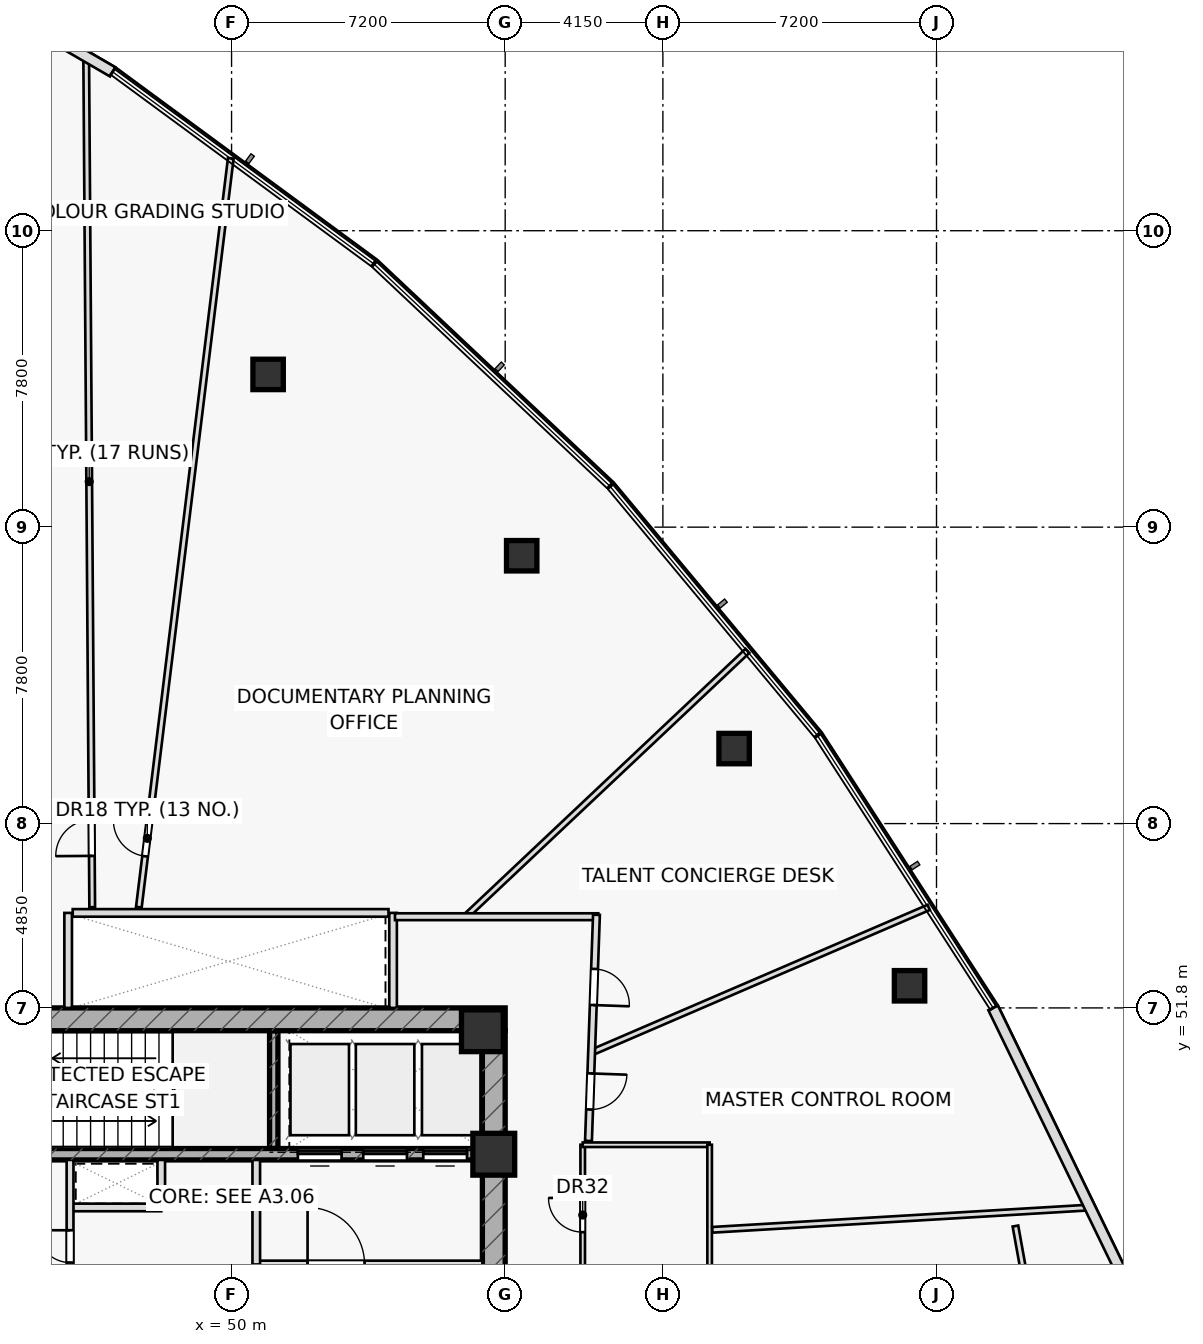
"""IFC4 building model, lengths in metres.
Left out: names, types, materials, properties, quantities, classifications, styles, units other than length and angle.
Written with IfcOpenShell. Run it as: python <this file> out.ifc"""

import sys

from ifc_helpers import new_model, si_unit, direction, frame, frame_2d, origin, origin_2d, place, context, subcontext, project, spatial, rectangle, hollow_rectangle, extrude, element, fill, save


model = new_model("IFC4")
c1 = context("Model", 3, precision=1e-05, world=origin(), true_north=direction((0.0, 1.0)))
c2 = subcontext(c1, "Body", "Model", "MODEL_VIEW")
j1 = project(units=[si_unit("LENGTHUNIT", "METRE"), si_unit("PLANEANGLEUNIT", "RADIAN")], contexts=[c1])
p1 = place(None, origin())
s1 = spatial("IfcSite", under=j1, at=p1, CompositionType="ELEMENT")
p2 = place(p1, origin())
s2 = spatial("IfcBuilding", under=s1, at=p2, CompositionType="ELEMENT")
p3 = place(p2, frame((0.0, 0.0, 51.0)))
s3 = spatial("IfcBuildingStorey", under=s2, at=p3, CompositionType="ELEMENT", Elevation=51.0)
p4 = place(p3, frame((51.11, 48.1, 0.0), z_axis=(0.0, 0.0, 1.0), x_axis=(0.0, 1.0, 0.0)))
e1 = element("IfcWall", 1, at=p4, inside=s3, PredefinedType="SHEAR", context=c2, shape_type="SweptSolid", body=[
    extrude(rectangle(XDim=3.1, YDim=0.22, at=frame_2d((1.55, 0.0))), origin(), (0.0, 0.0, 1.0), 3.6),
])
p5 = place(p3, frame((42.8, 51.5, 0.0), z_axis=(0.0, 0.0, 1.0), x_axis=(1.0, 0.0, 0.0)))
e2 = element("IfcWall", 2, at=p5, inside=s3, PredefinedType="SHEAR", context=c2, shape_type="SweptSolid", body=[
    extrude(rectangle(XDim=14.4, YDim=0.6, at=frame_2d((7.2, 0.0))), origin(), (0.0, 0.0, 1.0), 3.6),
])
p6 = place(p5, frame((0.88, 0.0, 0.0)))
e3 = element("IfcOpeningElement", 3, at=p6, cuts=e2, PredefinedType="OPENING", context=c2, shape_type="SweptSolid", body=[
    extrude(rectangle(XDim=1.05, YDim=2.2, at=frame_2d((0.525, 1.1))), frame((0.0, 0.31, 0.0), z_axis=(0.0, -1.0, 0.0), x_axis=(1.0, 0.0, 0.0)), (0.0, 0.0, 1.0), 0.62),
])
p7 = place(p3, frame((56.9, 38.8, 0.0), z_axis=(0.0, 0.0, 1.0), x_axis=(0.0, 1.0, 0.0)))
e4 = element("IfcWall", 4, at=p7, inside=s3, PredefinedType="SHEAR", context=c2, shape_type="SweptSolid", body=[
    extrude(rectangle(XDim=12.4, YDim=0.6, at=frame_2d((6.2, 0.0))), origin(), (0.0, 0.0, 1.0), 3.6),
])
p8 = place(p7, frame((3.85, 0.0, 0.0)))
e5 = element("IfcOpeningElement", 5, at=p8, cuts=e4, PredefinedType="OPENING", context=c2, shape_type="SweptSolid", body=[
    extrude(rectangle(XDim=1.5, YDim=2.2, at=frame_2d((0.75, 1.1))), frame((0.0, 0.31, 0.0), z_axis=(0.0, -1.0, 0.0), x_axis=(1.0, 0.0, 0.0)), (0.0, 0.0, 1.0), 0.62),
])
p9 = place(p3, frame((43.4, 47.95, 0.0), z_axis=(0.0, 0.0, 1.0), x_axis=(1.0, 0.0, 0.0)))
e6 = element("IfcWall", 6, at=p9, inside=s3, PredefinedType="SHEAR", context=c2, shape_type="SweptSolid", body=[
    extrude(rectangle(XDim=13.2, YDim=0.3, at=frame_2d((6.6, 0.0))), origin(), (0.0, 0.0, 1.0), 3.6),
])
p10 = place(p9, frame((8.345, 0.0, 0.0)))
e7 = element("IfcOpeningElement", 7, at=p10, cuts=e6, PredefinedType="OPENING", context=c2, shape_type="SweptSolid", body=[
    extrude(rectangle(XDim=1.15, YDim=2.2, at=frame_2d((0.575, 1.1))), frame((0.0, 0.16, 0.0), z_axis=(0.0, -1.0, 0.0), x_axis=(1.0, 0.0, 0.0)), (0.0, 0.0, 1.0), 0.32),
])
p11 = place(p9, frame((10.065, 0.0, 0.0)))
e8 = element("IfcOpeningElement", 8, at=p11, cuts=e6, PredefinedType="OPENING", context=c2, shape_type="SweptSolid", body=[
    extrude(rectangle(XDim=1.15, YDim=2.2, at=frame_2d((0.575, 1.1))), frame((0.0, 0.16, 0.0), z_axis=(0.0, -1.0, 0.0), x_axis=(1.0, 0.0, 0.0)), (0.0, 0.0, 1.0), 0.32),
])
p12 = place(p9, frame((11.645, 0.0, 0.0)))
e9 = element("IfcOpeningElement", 9, at=p12, cuts=e6, PredefinedType="OPENING", context=c2, shape_type="SweptSolid", body=[
    extrude(rectangle(XDim=1.15, YDim=2.2, at=frame_2d((0.575, 1.1))), frame((0.0, 0.16, 0.0), z_axis=(0.0, -1.0, 0.0), x_axis=(1.0, 0.0, 0.0)), (0.0, 0.0, 1.0), 0.32),
])
for number, where, z_axis, x_axis in (
    (10, (56.9, 47.95, 0.0), (0.0, 0.0, 1.0), (1.0, 0.0, 0.0)),
    (11, (56.6, 51.2, 0.0), (0.0, 0.0, 1.0), (1.0, 0.0, 0.0)),
):
    element("IfcColumn", number, at=place(p3, frame(where, z_axis=z_axis, x_axis=x_axis)), inside=s3, PredefinedType="COLUMN", context=c2, shape_type="SweptSolid", body=[
        extrude(rectangle(XDim=1.1, YDim=1.1, at=origin_2d()), origin(), (0.0, 0.0, 1.0), 3.6),
    ])
for number, where, z_axis, x_axis in (
    (12, (67.841, 52.383, 0.0), (0.0, 0.0, 1.0), (1.0, 0.0, 0.0)),
    (13, (63.224, 58.624, 0.0), (0.0, 0.0, 1.0), (1.0, 0.0, 0.0)),
    (14, (57.635, 63.698, 0.0), (0.0, 0.0, 1.0), (1.0, 0.0, 0.0)),
    (15, (50.962, 68.469, 0.0), (0.0, 0.0, 1.0), (1.0, 0.0, 0.0)),
):
    element("IfcColumn", number, at=place(p3, frame(where, z_axis=z_axis, x_axis=x_axis)), inside=s3, PredefinedType="COLUMN", context=c2, shape_type="SweptSolid", body=[
        extrude(hollow_rectangle(XDim=0.8, YDim=0.8, WallThickness=0.045, at=origin_2d()), origin(), (0.0, 0.0, 1.0), 3.6),
    ])
for number, where, z_axis, x_axis in (
    (16, (45.7, 51.8, 0.0), (0.0, 0.0, 1.0), (0.0, 1.0, 0.0)),
    (17, (54.25, 51.8, 0.0), (0.0, 0.0, 1.0), (0.0, 1.0, 0.0)),
):
    element("IfcWall", number, at=place(p3, frame(where, z_axis=z_axis, x_axis=x_axis)), inside=s3, PredefinedType="PARTITIONING", context=c2, shape_type="SweptSolid", body=[
        extrude(rectangle(XDim=2.5, YDim=0.2, at=frame_2d((1.25, 0.0))), origin(), (0.0, 0.0, 1.0), 3.6),
    ])
p13 = place(p3, frame((45.75, 46.55, 0.0), z_axis=(0.0, 0.0, 1.0), x_axis=(1.0, 0.0, 0.0)))
e18 = element("IfcWall", 18, at=p13, inside=s3, PredefinedType="PARTITIONING", context=c2, shape_type="SweptSolid", body=[
    extrude(rectangle(XDim=2.4, YDim=0.2, at=frame_2d((1.2, 0.0))), origin(), (0.0, 0.0, 1.0), 3.6),
])
p14 = place(p3, frame((48.15, 46.55, 0.0), z_axis=(0.0, 0.0, 1.0), x_axis=(0.0, 1.0, 0.0)))
e19 = element("IfcWall", 19, at=p14, inside=s3, PredefinedType="PARTITIONING", context=c2, shape_type="SweptSolid", body=[
    extrude(rectangle(XDim=1.25, YDim=0.2, at=frame_2d((0.625, 0.0))), origin(), (0.0, 0.0, 1.0), 3.6),
])
p15 = place(p3, frame((50.65, 45.05, 0.0), z_axis=(0.0, 0.0, 1.0), x_axis=(1.0, 0.0, 0.0)))
e20 = element("IfcWall", 20, at=p15, inside=s3, PredefinedType="PARTITIONING", context=c2, shape_type="SweptSolid", body=[
    extrude(rectangle(XDim=5.95, YDim=0.2, at=frame_2d((2.975, 0.0))), origin(), (0.0, 0.0, 1.0), 3.6),
])
p16 = place(p15, frame((1.35, 0.0, 0.0)))
e21 = element("IfcOpeningElement", 21, at=p16, cuts=e20, PredefinedType="OPENING", context=c2, shape_type="SweptSolid", body=[
    extrude(rectangle(XDim=1.5, YDim=2.2, at=frame_2d((0.75, 1.1))), frame((0.0, 0.11, 0.0), z_axis=(0.0, -1.0, 0.0), x_axis=(1.0, 0.0, 0.0)), (0.0, 0.0, 1.0), 0.22),
])
p17 = place(p3, frame((50.65, 45.05, 0.0), z_axis=(0.0, 0.0, 1.0), x_axis=(0.0, 1.0, 0.0)))
e22 = element("IfcWall", 22, at=p17, inside=s3, PredefinedType="PARTITIONING", context=c2, shape_type="SweptSolid", body=[
    extrude(rectangle(XDim=2.75, YDim=0.2, at=frame_2d((1.375, 0.0))), origin(), (0.0, 0.0, 1.0), 3.6),
])
p18 = place(p3, frame((45.75, 42.2, 0.0), z_axis=(0.0, 0.0, 1.0), x_axis=(0.0, 1.0, 0.0)))
e23 = element("IfcWall", 23, at=p18, inside=s3, PredefinedType="PARTITIONING", context=c2, shape_type="SweptSolid", body=[
    extrude(rectangle(XDim=5.6, YDim=0.18, at=frame_2d((2.8, 0.0))), origin(), (0.0, 0.0, 1.0), 3.6),
])
p19 = place(p18, frame((0.55, 0.0, 0.0)))
e24 = element("IfcOpeningElement", 24, at=p19, cuts=e23, PredefinedType="OPENING", context=c2, shape_type="SweptSolid", body=[
    extrude(rectangle(XDim=0.9, YDim=2.05, at=frame_2d((0.45, 1.025))), frame((0.0, 0.1, 0.0), z_axis=(0.0, -1.0, 0.0), x_axis=(1.0, 0.0, 0.0)), (0.0, 0.0, 1.0), 0.2),
])
p20 = place(p18, frame((2.9, 0.0, 0.0)))
e25 = element("IfcOpeningElement", 25, at=p20, cuts=e23, PredefinedType="OPENING", context=c2, shape_type="SweptSolid", body=[
    extrude(rectangle(XDim=0.85, YDim=2.05, at=frame_2d((0.425, 1.025))), frame((0.0, 0.1, 0.0), z_axis=(0.0, -1.0, 0.0), x_axis=(1.0, 0.0, 0.0)), (0.0, 0.0, 1.0), 0.2),
])
p21 = place(p3, frame((72.969, 33.091, 0.0), z_axis=(0.0, 0.0, 1.0), x_axis=(-0.177742578179, 0.984077017261, 0.0)))
e26 = element("IfcWall", 26, at=p21, inside=s3, PredefinedType="PARTITIONING", context=c2, shape_type="SweptSolid", body=[
    extrude(rectangle(XDim=13.179, YDim=0.15, at=frame_2d((6.59, 0.0))), origin(), (0.0, 0.0, 1.0), 2.925),
])
p22 = place(p3, frame((59.24, 41.2, 0.0), z_axis=(0.0, 0.0, 1.0), x_axis=(0.0, 1.0, 0.0)))
e27 = element("IfcWall", 27, at=p22, inside=s3, PredefinedType="PARTITIONING", context=c2, shape_type="SweptSolid", body=[
    extrude(rectangle(XDim=7.0, YDim=0.12, at=frame_2d((3.5, 0.0))), origin(), (0.0, 0.0, 1.0), 3.6),
])
p23 = place(p22, frame((1.15, 0.0, 0.0)))
e28 = element("IfcOpeningElement", 28, at=p23, cuts=e27, PredefinedType="OPENING", context=c2, shape_type="SweptSolid", body=[
    extrude(rectangle(XDim=0.9, YDim=2.05, at=frame_2d((0.45, 1.025))), frame((0.0, 0.07, 0.0), z_axis=(0.0, -1.0, 0.0), x_axis=(1.0, 0.0, 0.0)), (0.0, 0.0, 1.0), 0.14),
])
p24 = place(p22, frame((4.7, 0.0, 0.0)))
e29 = element("IfcOpeningElement", 29, at=p24, cuts=e27, PredefinedType="OPENING", context=c2, shape_type="SweptSolid", body=[
    extrude(rectangle(XDim=0.9, YDim=2.05, at=frame_2d((0.45, 1.025))), frame((0.0, 0.07, 0.0), z_axis=(0.0, -1.0, 0.0), x_axis=(1.0, 0.0, 0.0)), (0.0, 0.0, 1.0), 0.14),
])
p25 = place(p3, frame((59.24, 48.2, 0.0), z_axis=(0.0, 0.0, 1.0), x_axis=(1.0, 0.0, 0.0)))
e30 = element("IfcWall", 30, at=p25, inside=s3, PredefinedType="PARTITIONING", context=c2, shape_type="SweptSolid", body=[
    extrude(rectangle(XDim=3.34, YDim=0.12, at=frame_2d((1.67, 0.0))), origin(), (0.0, 0.0, 1.0), 3.6),
])
p26 = place(p3, frame((62.58, 41.2, 0.0), z_axis=(0.0, 0.0, 1.0), x_axis=(0.0, 1.0, 0.0)))
e31 = element("IfcWall", 31, at=p26, inside=s3, PredefinedType="PARTITIONING", context=c2, shape_type="SweptSolid", body=[
    extrude(rectangle(XDim=7.0, YDim=0.12, at=frame_2d((3.5, 0.0))), origin(), (0.0, 0.0, 1.0), 3.6),
])
p27 = place(p3, frame((47.56, 54.45, 0.0), z_axis=(0.0, 0.0, 1.0), x_axis=(0.12187323667, 0.992545673601, 0.0)))
e32 = element("IfcWall", 32, at=p27, inside=s3, PredefinedType="PARTITIONING", context=c2, shape_type="SweptSolid", body=[
    extrude(rectangle(XDim=19.854, YDim=0.15, at=frame_2d((9.927, 0.0))), origin(), (0.0, 0.0, 1.0), 2.975),
])
p28 = place(p27, frame((1.35, 0.0, 0.0)))
e33 = element("IfcOpeningElement", 33, at=p28, cuts=e32, PredefinedType="OPENING", context=c2, shape_type="SweptSolid", body=[
    extrude(rectangle(XDim=0.95, YDim=2.05, at=frame_2d((0.475, 1.025))), frame((0.0, 0.085, 0.0), z_axis=(0.0, -1.0, 0.0), x_axis=(1.0, 0.0, 0.0)), (0.0, 0.0, 1.0), 0.17),
])
p29 = place(p3, frame((46.333, 54.45, 0.0), z_axis=(0.0, 0.0, 1.0), x_axis=(-0.007063802918, 0.999975051033, 0.0)))
e34 = element("IfcWall", 34, at=p29, inside=s3, PredefinedType="PARTITIONING", context=c2, shape_type="SweptSolid", body=[
    extrude(rectangle(XDim=22.396, YDim=0.15, at=frame_2d((11.198, 0.0))), origin(), (0.0, 0.0, 1.0), 2.975),
])
p30 = place(p29, frame((1.35, 0.0, 0.0)))
e35 = element("IfcOpeningElement", 35, at=p30, cuts=e34, PredefinedType="OPENING", context=c2, shape_type="SweptSolid", body=[
    extrude(rectangle(XDim=0.95, YDim=2.05, at=frame_2d((0.475, 1.025))), frame((0.0, 0.085, 0.0), z_axis=(0.0, -1.0, 0.0), x_axis=(1.0, 0.0, 0.0)), (0.0, 0.0, 1.0), 0.17),
])
p31 = place(p3, frame((62.65, 45.961, 0.0), z_axis=(0.0, 0.0, 1.0), x_axis=(0.99825565381, 0.059039390554, 0.0)))
e36 = element("IfcWall", 36, at=p31, inside=s3, PredefinedType="PARTITIONING", context=c2, shape_type="SweptSolid", body=[
    extrude(rectangle(XDim=9.966, YDim=0.15, at=frame_2d((4.983, 0.0))), origin(), (0.0, 0.0, 1.0), 2.975),
])
p32 = place(p3, frame((59.474, 50.627, 0.0), z_axis=(0.0, 0.0, 1.0), x_axis=(0.918538605695, 0.395331291259, 0.0)))
e37 = element("IfcWall", 37, at=p32, inside=s3, PredefinedType="PARTITIONING", context=c2, shape_type="SweptSolid", body=[
    extrude(rectangle(XDim=9.659, YDim=0.15, at=frame_2d((4.829, 0.0))), origin(), (0.0, 0.0, 1.0), 2.925),
])
p33 = place(p3, frame((56.156, 54.2, 0.0), z_axis=(0.0, 0.0, 1.0), x_axis=(0.727548772569, 0.686055962392, 0.0)))
e38 = element("IfcWall", 38, at=p33, inside=s3, PredefinedType="PARTITIONING", context=c2, shape_type="SweptSolid", body=[
    extrude(rectangle(XDim=10.197, YDim=0.15, at=frame_2d((5.098, 0.0))), origin(), (0.0, 0.0, 1.0), 2.925),
])
p34 = place(p3, frame((54.3, 54.2, 0.0), z_axis=(0.0, 0.0, 1.0), x_axis=(1.0, 0.0, 0.0)))
e39 = element("IfcWall", 39, at=p34, inside=s3, PredefinedType="PARTITIONING", context=c2, shape_type="SweptSolid", body=[
    extrude(rectangle(XDim=5.35, YDim=0.18, at=frame_2d((2.675, 0.0))), origin(), (0.0, 0.0, 1.0), 2.925),
])
p35 = place(p3, frame((59.602, 54.25, 0.0), z_axis=(0.0, 0.0, 1.0), x_axis=(-0.035265891834, -0.999377964973, 0.0)))
e40 = element("IfcWall", 40, at=p35, inside=s3, PredefinedType="PARTITIONING", context=c2, shape_type="SweptSolid", body=[
    extrude(rectangle(XDim=5.954, YDim=0.18, at=frame_2d((2.977, 0.0))), origin(), (0.0, 0.0, 1.0), 2.925),
])
p36 = place(p35, frame((1.426, 0.0, 0.0)))
e41 = element("IfcOpeningElement", 41, at=p36, cuts=e40, PredefinedType="OPENING", context=c2, shape_type="SweptSolid", body=[
    extrude(rectangle(XDim=0.95, YDim=2.05, at=frame_2d((0.475, 1.025))), frame((0.0, 0.1, 0.0), z_axis=(0.0, -1.0, 0.0), x_axis=(1.0, 0.0, 0.0)), (0.0, 0.0, 1.0), 0.2),
])
p37 = place(p35, frame((4.176, 0.0, 0.0)))
e42 = element("IfcOpeningElement", 42, at=p37, cuts=e40, PredefinedType="OPENING", context=c2, shape_type="SweptSolid", body=[
    extrude(rectangle(XDim=0.95, YDim=2.05, at=frame_2d((0.475, 1.025))), frame((0.0, 0.1, 0.0), z_axis=(0.0, -1.0, 0.0), x_axis=(1.0, 0.0, 0.0)), (0.0, 0.0, 1.0), 0.2),
])
p38 = place(p3, frame((46.871, 76.43, 0.0), z_axis=(0.0, 0.0, 1.0), x_axis=(-0.86470757028, 0.502275639366, 0.0)))
e43 = element("IfcWall", 43, at=p38, inside=s3, PredefinedType="STANDARD", context=c2, shape_type="SweptSolid", body=[
    extrude(rectangle(XDim=2.228, YDim=0.28, at=frame_2d((1.114, 0.0))), origin(), (0.0, 0.0, 1.0), 3.6),
])
p39 = place(p3, frame((73.772, 44.106, 0.0), z_axis=(0.0, 0.0, 1.0), x_axis=(-0.436413579007, 0.899746179796, 0.0)))
e44 = element("IfcWall", 44, at=p39, inside=s3, PredefinedType="STANDARD", context=c2, shape_type="SweptSolid", body=[
    extrude(rectangle(XDim=8.552, YDim=0.28, at=frame_2d((4.276, 0.0))), origin(), (0.0, 0.0, 1.0), 3.6),
])
p40 = place(p3, frame((45.82, 54.3, 0.0), z_axis=(0.0, 0.0, 1.0), x_axis=(1.0, 0.0, 0.0)))
e45 = element("IfcWall", 45, at=p40, inside=s3, PredefinedType="PARTITIONING", context=c2, shape_type="SweptSolid", body=[
    extrude(rectangle(XDim=8.31, YDim=0.2, at=frame_2d((4.155, 0.0))), origin(), (0.0, 0.0, 1.0), 3.6),
])
p41 = place(p16, origin())
e46 = element("IfcDoor", 46, at=p41, inside=s3, OperationType="SINGLE_SWING_LEFT", PredefinedType="DOOR", context=c2, shape_type="SweptSolid", body=[
    extrude(rectangle(XDim=1.5, YDim=2.2, at=frame_2d((0.75, 1.1))), frame((0.0, 0.025, 0.0), z_axis=(0.0, -1.0, 0.0), x_axis=(1.0, 0.0, 0.0)), (0.0, 0.0, 1.0), 0.05),
])
fill(e21, e46)
p42 = place(p20, origin())
e47 = element("IfcDoor", 47, at=p42, inside=s3, OperationType="SINGLE_SWING_RIGHT", PredefinedType="DOOR", context=c2, shape_type="SweptSolid", body=[
    extrude(rectangle(XDim=0.85, YDim=2.05, at=frame_2d((0.425, 1.025))), frame((0.0, 0.025, 0.0), z_axis=(0.0, -1.0, 0.0), x_axis=(1.0, 0.0, 0.0)), (0.0, 0.0, 1.0), 0.05),
])
fill(e25, e47)
p43 = place(p24, origin())
e48 = element("IfcDoor", 48, at=p43, inside=s3, OperationType="SINGLE_SWING_RIGHT", PredefinedType="DOOR", context=c2, shape_type="SweptSolid", body=[
    extrude(rectangle(XDim=0.9, YDim=2.05, at=frame_2d((0.45, 1.025))), frame((0.0, 0.025, 0.0), z_axis=(0.0, -1.0, 0.0), x_axis=(1.0, 0.0, 0.0)), (0.0, 0.0, 1.0), 0.05),
])
fill(e29, e48)
p44 = place(p28, origin())
e49 = element("IfcDoor", 49, at=p44, inside=s3, OperationType="SINGLE_SWING_RIGHT", PredefinedType="DOOR", context=c2, shape_type="SweptSolid", body=[
    extrude(rectangle(XDim=0.95, YDim=2.05, at=frame_2d((0.475, 1.025))), frame((0.0, 0.025, 0.0), z_axis=(0.0, -1.0, 0.0), x_axis=(1.0, 0.0, 0.0)), (0.0, 0.0, 1.0), 0.05),
])
fill(e33, e49)
p45 = place(p30, origin())
e50 = element("IfcDoor", 50, at=p45, inside=s3, OperationType="SINGLE_SWING_LEFT", PredefinedType="DOOR", context=c2, shape_type="SweptSolid", body=[
    extrude(rectangle(XDim=0.95, YDim=2.05, at=frame_2d((0.475, 1.025))), frame((0.0, 0.025, 0.0), z_axis=(0.0, -1.0, 0.0), x_axis=(1.0, 0.0, 0.0)), (0.0, 0.0, 1.0), 0.05),
])
fill(e35, e50)
p46 = place(p36, origin())
e51 = element("IfcDoor", 51, at=p46, inside=s3, OperationType="SINGLE_SWING_RIGHT", PredefinedType="DOOR", context=c2, shape_type="SweptSolid", body=[
    extrude(rectangle(XDim=0.95, YDim=2.05, at=frame_2d((0.475, 1.025))), frame((0.0, 0.025, 0.0), z_axis=(0.0, -1.0, 0.0), x_axis=(1.0, 0.0, 0.0)), (0.0, 0.0, 1.0), 0.05),
])
fill(e41, e51)
p47 = place(p37, origin())
e52 = element("IfcDoor", 52, at=p47, inside=s3, OperationType="SINGLE_SWING_LEFT", PredefinedType="DOOR", context=c2, shape_type="SweptSolid", body=[
    extrude(rectangle(XDim=0.95, YDim=2.05, at=frame_2d((0.475, 1.025))), frame((0.0, 0.025, 0.0), z_axis=(0.0, -1.0, 0.0), x_axis=(1.0, 0.0, 0.0)), (0.0, 0.0, 1.0), 0.05),
])
fill(e42, e52)
p48 = place(p10, origin())
e53 = element("IfcDoor", 53, at=p48, inside=s3, OperationType="SLIDING_TO_LEFT", PredefinedType="DOOR", context=c2, shape_type="SweptSolid", body=[
    extrude(rectangle(XDim=1.15, YDim=2.2, at=frame_2d((0.575, 1.1))), frame((0.0, 0.025, 0.0), z_axis=(0.0, -1.0, 0.0), x_axis=(1.0, 0.0, 0.0)), (0.0, 0.0, 1.0), 0.05),
])
fill(e7, e53)
p49 = place(p11, origin())
e54 = element("IfcDoor", 54, at=p49, inside=s3, OperationType="SLIDING_TO_LEFT", PredefinedType="DOOR", context=c2, shape_type="SweptSolid", body=[
    extrude(rectangle(XDim=1.15, YDim=2.2, at=frame_2d((0.575, 1.1))), frame((0.0, 0.025, 0.0), z_axis=(0.0, -1.0, 0.0), x_axis=(1.0, 0.0, 0.0)), (0.0, 0.0, 1.0), 0.05),
])
fill(e8, e54)
p50 = place(p12, origin())
e55 = element("IfcDoor", 55, at=p50, inside=s3, OperationType="SLIDING_TO_LEFT", PredefinedType="DOOR", context=c2, shape_type="SweptSolid", body=[
    extrude(rectangle(XDim=1.15, YDim=2.2, at=frame_2d((0.575, 1.1))), frame((0.0, 0.025, 0.0), z_axis=(0.0, -1.0, 0.0), x_axis=(1.0, 0.0, 0.0)), (0.0, 0.0, 1.0), 0.05),
])
fill(e9, e55)
save(model, sys.argv[1])
